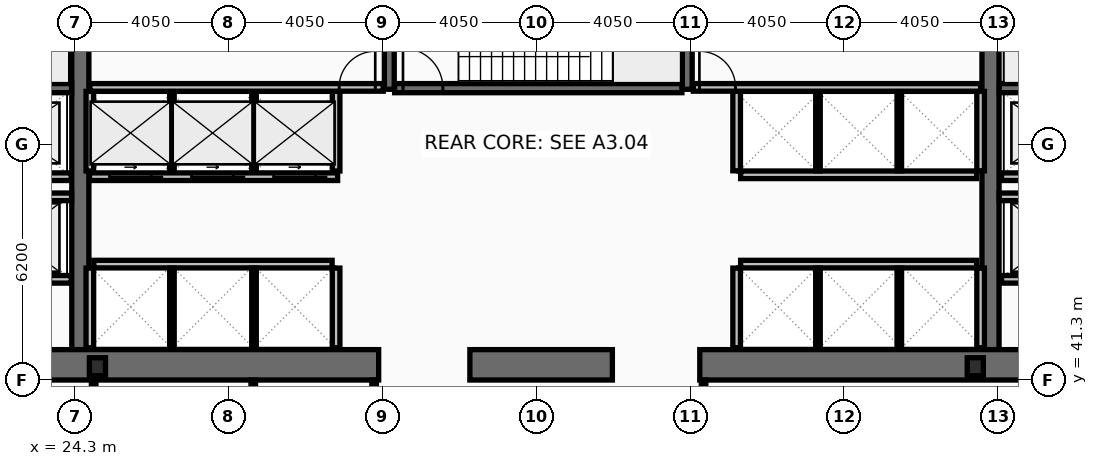
"""IFC4 building model, lengths in metres.
Left out: names, types, materials, properties, quantities, classifications, styles, units other than length and angle.
Written with IfcOpenShell. Run it as: python <this file> out.ifc"""

import sys

from ifc_helpers import new_model, si_unit, direction, frame, frame_2d, origin, origin_2d, place, context, subcontext, project, spatial, rectangle, i_section, extrude, element, fill, save


model = new_model("IFC4")
c1 = context("Model", 3, precision=1e-05, world=origin(), true_north=direction((0.0, 1.0)))
c2 = subcontext(c1, "Body", "Model", "MODEL_VIEW")
j1 = project(units=[si_unit("LENGTHUNIT", "METRE"), si_unit("PLANEANGLEUNIT", "RADIAN")], contexts=[c1])
p1 = place(None, origin())
s1 = spatial("IfcSite", under=j1, at=p1, CompositionType="ELEMENT")
p2 = place(p1, origin())
s2 = spatial("IfcBuilding", under=s1, at=p2, CompositionType="ELEMENT")
p3 = place(p2, frame((0.0, 0.0, 15.4)))
s3 = spatial("IfcBuildingStorey", under=s2, at=p3, CompositionType="ELEMENT", Elevation=15.4)
for number, where, z_axis, x_axis in (
    (1, (24.45, 42.1, 0.0), (0.0, 0.0, 1.0), (0.0, 1.0, 0.0)),
    (2, (48.4, 42.1, 0.0), (0.0, 0.0, 1.0), (0.0, 1.0, 0.0)),
):
    element("IfcWall", number, at=place(p3, frame(where, z_axis=z_axis, x_axis=x_axis)), inside=s3, PredefinedType="SHEAR", context=c2, shape_type="SweptSolid", body=[
        extrude(rectangle(XDim=10.8, YDim=0.45, at=frame_2d((5.4, 0.0))), origin(), (0.0, 0.0, 1.0), 4.78),
    ])
p4 = place(p3, frame((32.3, 41.7, 0.0), z_axis=(0.0, 0.0, 1.0), x_axis=(-1.0, 0.0, 0.0)))
e3 = element("IfcWall", 3, at=p4, inside=s3, PredefinedType="SHEAR", context=c2, shape_type="SweptSolid", body=[
    extrude(rectangle(XDim=11.45, YDim=0.8, at=frame_2d((5.725, 0.0))), origin(), (0.0, 0.0, 1.0), 4.78),
])
p5 = place(p3, frame((38.45, 41.7, 0.0), z_axis=(0.0, 0.0, 1.0), x_axis=(-1.0, 0.0, 0.0)))
e4 = element("IfcWall", 4, at=p5, inside=s3, PredefinedType="SHEAR", context=c2, shape_type="SweptSolid", body=[
    extrude(rectangle(XDim=3.75, YDim=0.8, at=frame_2d((1.875, 0.0))), origin(), (0.0, 0.0, 1.0), 4.78),
])
p6 = place(p3, frame((52.05, 41.7, 0.0), z_axis=(0.0, 0.0, 1.0), x_axis=(-1.0, 0.0, 0.0)))
e5 = element("IfcWall", 5, at=p6, inside=s3, PredefinedType="SHEAR", context=c2, shape_type="SweptSolid", body=[
    extrude(rectangle(XDim=11.3, YDim=0.8, at=frame_2d((5.65, 0.0))), origin(), (0.0, 0.0, 1.0), 4.78),
])
for number, where, z_axis, x_axis in (
    (6, (32.58, 48.95, 0.0), (0.0, 0.0, 1.0), (0.0, 1.0, 0.0)),
    (7, (40.42, 48.95, 0.0), (0.0, 0.0, 1.0), (0.0, 1.0, 0.0)),
):
    element("IfcWall", number, at=place(p3, frame(where, z_axis=z_axis, x_axis=x_axis)), inside=s3, PredefinedType="SHEAR", context=c2, shape_type="SweptSolid", body=[
        extrude(rectangle(XDim=3.95, YDim=0.26, at=frame_2d((1.975, 0.0))), origin(), (0.0, 0.0, 1.0), 4.78),
    ])
p7 = place(p3, frame((17.0, 48.98, 0.0), z_axis=(0.0, 0.0, 1.0), x_axis=(1.0, 0.0, 0.0)))
e8 = element("IfcWall", 8, at=p7, inside=s3, PredefinedType="SHEAR", context=c2, shape_type="SweptSolid", body=[
    extrude(rectangle(XDim=7.22, YDim=0.24, at=frame_2d((3.61, 0.0))), origin(), (0.0, 0.0, 1.0), 4.78),
])
p8 = place(p7, frame((0.22, 0.0, 0.0)))
e9 = element("IfcOpeningElement", 9, at=p8, cuts=e8, PredefinedType="OPENING", context=c2, shape_type="SweptSolid", body=[
    extrude(rectangle(XDim=1.05, YDim=2.15, at=frame_2d((0.525, 1.075))), frame((0.0, 0.13, 0.0), z_axis=(0.0, -1.0, 0.0), x_axis=(1.0, 0.0, 0.0)), (0.0, 0.0, 1.0), 0.26),
])
p9 = place(p3, frame((48.63, 48.98, 0.0), z_axis=(0.0, 0.0, 1.0), x_axis=(1.0, 0.0, 0.0)))
e10 = element("IfcWall", 10, at=p9, inside=s3, PredefinedType="SHEAR", context=c2, shape_type="SweptSolid", body=[
    extrude(rectangle(XDim=7.27, YDim=0.24, at=frame_2d((3.635, 0.0))), origin(), (0.0, 0.0, 1.0), 4.78),
])
p10 = place(p9, frame((6.0, 0.0, 0.0)))
e11 = element("IfcOpeningElement", 11, at=p10, cuts=e10, PredefinedType="OPENING", context=c2, shape_type="SweptSolid", body=[
    extrude(rectangle(XDim=1.05, YDim=2.15, at=frame_2d((0.525, 1.075))), frame((0.0, 0.13, 0.0), z_axis=(0.0, -1.0, 0.0), x_axis=(1.0, 0.0, 0.0)), (0.0, 0.0, 1.0), 0.26),
])
p11 = place(p3, frame((32.72, 48.98, 0.0), z_axis=(0.0, 0.0, 1.0), x_axis=(1.0, 0.0, 0.0)))
e12 = element("IfcWall", 12, at=p11, inside=s3, PredefinedType="SHEAR", context=c2, shape_type="SweptSolid", body=[
    extrude(rectangle(XDim=7.56, YDim=0.24, at=frame_2d((3.78, 0.0))), origin(), (0.0, 0.0, 1.0), 4.78),
])
p12 = place(p11, frame((0.22, 0.0, 0.0)))
e13 = element("IfcOpeningElement", 13, at=p12, cuts=e12, PredefinedType="OPENING", context=c2, shape_type="SweptSolid", body=[
    extrude(rectangle(XDim=1.05, YDim=2.15, at=frame_2d((0.525, 1.075))), frame((0.0, 0.13, 0.0), z_axis=(0.0, -1.0, 0.0), x_axis=(1.0, 0.0, 0.0)), (0.0, 0.0, 1.0), 0.26),
])
for number, where, z_axis, x_axis in (
    (14, (24.9, 41.65, 0.0), (0.0, 0.0, 1.0), (1.0, 0.0, 0.0)),
    (15, (48.0, 41.65, 0.0), (0.0, 0.0, 1.0), (1.0, 0.0, 0.0)),
):
    element("IfcColumn", number, at=place(p3, frame(where, z_axis=z_axis, x_axis=x_axis)), inside=s3, PredefinedType="COLUMN", context=c2, shape_type="SweptSolid", body=[
        extrude(i_section(OverallWidth=0.424, OverallDepth=0.474, WebThickness=0.048, FlangeThickness=0.077, at=origin_2d()), origin(), (0.0, 0.0, 1.0), 5.0),
    ])
p13 = place(p3, frame((51.61, 43.95, 0.0), z_axis=(0.0, 0.0, 1.0), x_axis=(-1.0, 0.0, 0.0)))
e16 = element("IfcWall", 16, at=p13, inside=s3, PredefinedType="PARTITIONING", context=c2, shape_type="SweptSolid", body=[
    extrude(rectangle(XDim=2.92, YDim=0.2, at=frame_2d((1.46, 0.0))), origin(), (0.0, 0.0, 1.0), 4.78),
])
p14 = place(p13, frame((0.81, 0.0, 0.0)))
e17 = element("IfcOpeningElement", 17, at=p14, cuts=e16, PredefinedType="OPENING", context=c2, shape_type="SweptSolid", body=[
    extrude(rectangle(XDim=1.3, YDim=2.18, at=frame_2d((0.65, 1.09))), frame((0.0, 0.11, 0.0), z_axis=(0.0, -1.0, 0.0), x_axis=(1.0, 0.0, 0.0)), (0.0, 0.0, 1.0), 0.22),
])
p15 = place(p3, frame((24.21, 43.95, 0.0), z_axis=(0.0, 0.0, 1.0), x_axis=(-1.0, 0.0, 0.0)))
e18 = element("IfcWall", 18, at=p15, inside=s3, PredefinedType="PARTITIONING", context=c2, shape_type="SweptSolid", body=[
    extrude(rectangle(XDim=2.97, YDim=0.2, at=frame_2d((1.485, 0.0))), origin(), (0.0, 0.0, 1.0), 4.78),
])
p16 = place(p15, frame((0.86, 0.0, 0.0)))
e19 = element("IfcOpeningElement", 19, at=p16, cuts=e18, PredefinedType="OPENING", context=c2, shape_type="SweptSolid", body=[
    extrude(rectangle(XDim=1.3, YDim=2.18, at=frame_2d((0.65, 1.09))), frame((0.0, 0.11, 0.0), z_axis=(0.0, -1.0, 0.0), x_axis=(1.0, 0.0, 0.0)), (0.0, 0.0, 1.0), 0.22),
])
p17 = place(p3, frame((51.61, 46.65, 0.0), z_axis=(0.0, 0.0, 1.0), x_axis=(-1.0, 0.0, 0.0)))
e20 = element("IfcWall", 20, at=p17, inside=s3, PredefinedType="PARTITIONING", context=c2, shape_type="SweptSolid", body=[
    extrude(rectangle(XDim=2.92, YDim=0.2, at=frame_2d((1.46, 0.0))), origin(), (0.0, 0.0, 1.0), 4.78),
])
p18 = place(p17, frame((0.86, 0.0, 0.0)))
e21 = element("IfcOpeningElement", 21, at=p18, cuts=e20, PredefinedType="OPENING", context=c2, shape_type="SweptSolid", body=[
    extrude(rectangle(XDim=1.2, YDim=2.18, at=frame_2d((0.6, 1.09))), frame((0.0, 0.11, 0.0), z_axis=(0.0, -1.0, 0.0), x_axis=(1.0, 0.0, 0.0)), (0.0, 0.0, 1.0), 0.22),
])
p19 = place(p3, frame((24.21, 46.65, 0.0), z_axis=(0.0, 0.0, 1.0), x_axis=(-1.0, 0.0, 0.0)))
e22 = element("IfcWall", 22, at=p19, inside=s3, PredefinedType="PARTITIONING", context=c2, shape_type="SweptSolid", body=[
    extrude(rectangle(XDim=2.97, YDim=0.2, at=frame_2d((1.485, 0.0))), origin(), (0.0, 0.0, 1.0), 4.78),
])
p20 = place(p19, frame((0.91, 0.0, 0.0)))
e23 = element("IfcOpeningElement", 23, at=p20, cuts=e22, PredefinedType="OPENING", context=c2, shape_type="SweptSolid", body=[
    extrude(rectangle(XDim=1.2, YDim=2.18, at=frame_2d((0.6, 1.09))), frame((0.0, 0.11, 0.0), z_axis=(0.0, -1.0, 0.0), x_axis=(1.0, 0.0, 0.0)), (0.0, 0.0, 1.0), 0.22),
])
p21 = place(p3, frame((31.22, 46.65, 0.0), z_axis=(0.0, 0.0, 1.0), x_axis=(-1.0, 0.0, 0.0)))
e24 = element("IfcWall", 24, at=p21, inside=s3, PredefinedType="PARTITIONING", context=c2, shape_type="SweptSolid", body=[
    extrude(rectangle(XDim=6.53, YDim=0.2, at=frame_2d((3.265, 0.0))), origin(), (0.0, 0.0, 1.0), 4.78),
])
p22 = place(p21, frame((4.9, 0.0, 0.0)))
e25 = element("IfcOpeningElement", 25, at=p22, cuts=e24, PredefinedType="OPENING", context=c2, shape_type="SweptSolid", body=[
    extrude(rectangle(XDim=1.1, YDim=2.18, at=frame_2d((0.55, 1.09))), frame((0.0, 0.11, 0.0), z_axis=(0.0, -1.0, 0.0), x_axis=(1.0, 0.0, 0.0)), (0.0, 0.0, 1.0), 0.22),
])
p23 = place(p21, frame((2.74, 0.0, 0.0)))
e26 = element("IfcOpeningElement", 26, at=p23, cuts=e24, PredefinedType="OPENING", context=c2, shape_type="SweptSolid", body=[
    extrude(rectangle(XDim=1.1, YDim=2.18, at=frame_2d((0.55, 1.09))), frame((0.0, 0.11, 0.0), z_axis=(0.0, -1.0, 0.0), x_axis=(1.0, 0.0, 0.0)), (0.0, 0.0, 1.0), 0.22),
])
p24 = place(p21, frame((0.58, 0.0, 0.0)))
e27 = element("IfcOpeningElement", 27, at=p24, cuts=e24, PredefinedType="OPENING", context=c2, shape_type="SweptSolid", body=[
    extrude(rectangle(XDim=1.1, YDim=2.18, at=frame_2d((0.55, 1.09))), frame((0.0, 0.11, 0.0), z_axis=(0.0, -1.0, 0.0), x_axis=(1.0, 0.0, 0.0)), (0.0, 0.0, 1.0), 0.22),
])
p25 = place(p3, frame((21.2, 46.12, 0.0), z_axis=(0.0, 0.0, 1.0), x_axis=(1.0, 0.0, 0.0)))
e28 = element("IfcWall", 28, at=p25, inside=s3, PredefinedType="PARTITIONING", context=c2, shape_type="SweptSolid", body=[
    extrude(rectangle(XDim=3.02, YDim=0.2, at=frame_2d((1.51, 0.0))), origin(), (0.0, 0.0, 1.0), 4.78),
])
p26 = place(p3, frame((48.63, 46.12, 0.0), z_axis=(0.0, 0.0, 1.0), x_axis=(1.0, 0.0, 0.0)))
e29 = element("IfcWall", 29, at=p26, inside=s3, PredefinedType="PARTITIONING", context=c2, shape_type="SweptSolid", body=[
    extrude(rectangle(XDim=3.07, YDim=0.2, at=frame_2d((1.535, 0.0))), origin(), (0.0, 0.0, 1.0), 4.78),
])
for number, where, z_axis, x_axis in (
    (30, (24.7, 46.8, 0.0), (0.0, 0.0, 1.0), (0.0, 1.0, 0.0)),
    (31, (31.18, 46.8, 0.0), (0.0, 0.0, 1.0), (0.0, 1.0, 0.0)),
):
    element("IfcWall", number, at=place(p3, frame(where, z_axis=z_axis, x_axis=x_axis)), inside=s3, PredefinedType="PARTITIONING", context=c2, shape_type="SweptSolid", body=[
        extrude(rectangle(XDim=2.095, YDim=0.2, at=frame_2d((1.047, 0.0))), origin(), (0.0, 0.0, 1.0), 4.78),
    ])
for number, where, z_axis, x_axis in (
    (32, (26.86, 46.8, 0.0), (0.0, 0.0, 1.0), (0.0, 1.0, 0.0)),
    (33, (29.02, 46.8, 0.0), (0.0, 0.0, 1.0), (0.0, 1.0, 0.0)),
):
    element("IfcWall", number, at=place(p3, frame(where, z_axis=z_axis, x_axis=x_axis)), inside=s3, PredefinedType="PARTITIONING", context=c2, shape_type="SweptSolid", body=[
        extrude(rectangle(XDim=2.095, YDim=0.12, at=frame_2d((1.047, 0.0))), origin(), (0.0, 0.0, 1.0), 4.78),
    ])
p27 = place(p3, frame((24.805, 44.35, 0.0), z_axis=(0.0, 0.0, 1.0), x_axis=(1.0, 0.0, 0.0)))
e34 = element("IfcWall", 34, at=p27, inside=s3, PredefinedType="PARTITIONING", context=c2, shape_type="SweptSolid", body=[
    extrude(rectangle(XDim=6.27, YDim=0.2, at=frame_2d((3.135, 0.0))), origin(), (0.0, 0.0, 1.0), 4.78),
])
for number, where, z_axis, x_axis in (
    (35, (24.7, 42.15, 0.0), (0.0, 0.0, 1.0), (0.0, 1.0, 0.0)),
    (36, (31.18, 42.15, 0.0), (0.0, 0.0, 1.0), (0.0, 1.0, 0.0)),
):
    element("IfcWall", number, at=place(p3, frame(where, z_axis=z_axis, x_axis=x_axis)), inside=s3, PredefinedType="PARTITIONING", context=c2, shape_type="SweptSolid", body=[
        extrude(rectangle(XDim=2.095, YDim=0.2, at=frame_2d((1.048, 0.0))), origin(), (0.0, 0.0, 1.0), 4.78),
    ])
for number, where, z_axis, x_axis in (
    (37, (26.86, 42.15, 0.0), (0.0, 0.0, 1.0), (0.0, 1.0, 0.0)),
    (38, (29.02, 42.15, 0.0), (0.0, 0.0, 1.0), (0.0, 1.0, 0.0)),
):
    element("IfcWall", number, at=place(p3, frame(where, z_axis=z_axis, x_axis=x_axis)), inside=s3, PredefinedType="PARTITIONING", context=c2, shape_type="SweptSolid", body=[
        extrude(rectangle(XDim=2.095, YDim=0.12, at=frame_2d((1.048, 0.0))), origin(), (0.0, 0.0, 1.0), 4.78),
    ])
p28 = place(p3, frame((41.825, 46.7, 0.0), z_axis=(0.0, 0.0, 1.0), x_axis=(1.0, 0.0, 0.0)))
e39 = element("IfcWall", 39, at=p28, inside=s3, PredefinedType="PARTITIONING", context=c2, shape_type="SweptSolid", body=[
    extrude(rectangle(XDim=6.21, YDim=0.2, at=frame_2d((3.105, 0.0))), origin(), (0.0, 0.0, 1.0), 4.78),
])
for number, where, z_axis, x_axis in (
    (40, (41.72, 46.805, 0.0), (0.0, 0.0, 1.0), (0.0, 1.0, 0.0)),
    (41, (48.14, 46.805, 0.0), (0.0, 0.0, 1.0), (0.0, 1.0, 0.0)),
):
    element("IfcWall", number, at=place(p3, frame(where, z_axis=z_axis, x_axis=x_axis)), inside=s3, PredefinedType="PARTITIONING", context=c2, shape_type="SweptSolid", body=[
        extrude(rectangle(XDim=2.09, YDim=0.2, at=frame_2d((1.045, 0.0))), origin(), (0.0, 0.0, 1.0), 4.78),
    ])
for number, where, z_axis, x_axis in (
    (42, (43.86, 46.805, 0.0), (0.0, 0.0, 1.0), (0.0, 1.0, 0.0)),
    (43, (46.0, 46.805, 0.0), (0.0, 0.0, 1.0), (0.0, 1.0, 0.0)),
):
    element("IfcWall", number, at=place(p3, frame(where, z_axis=z_axis, x_axis=x_axis)), inside=s3, PredefinedType="PARTITIONING", context=c2, shape_type="SweptSolid", body=[
        extrude(rectangle(XDim=2.09, YDim=0.12, at=frame_2d((1.045, 0.0))), origin(), (0.0, 0.0, 1.0), 4.78),
    ])
p29 = place(p3, frame((41.825, 44.35, 0.0), z_axis=(0.0, 0.0, 1.0), x_axis=(1.0, 0.0, 0.0)))
e44 = element("IfcWall", 44, at=p29, inside=s3, PredefinedType="PARTITIONING", context=c2, shape_type="SweptSolid", body=[
    extrude(rectangle(XDim=6.21, YDim=0.2, at=frame_2d((3.105, 0.0))), origin(), (0.0, 0.0, 1.0), 4.78),
])
for number, where, z_axis, x_axis in (
    (45, (41.72, 42.15, 0.0), (0.0, 0.0, 1.0), (0.0, 1.0, 0.0)),
    (46, (48.14, 42.15, 0.0), (0.0, 0.0, 1.0), (0.0, 1.0, 0.0)),
):
    element("IfcWall", number, at=place(p3, frame(where, z_axis=z_axis, x_axis=x_axis)), inside=s3, PredefinedType="PARTITIONING", context=c2, shape_type="SweptSolid", body=[
        extrude(rectangle(XDim=2.095, YDim=0.2, at=frame_2d((1.048, 0.0))), origin(), (0.0, 0.0, 1.0), 4.78),
    ])
for number, where, z_axis, x_axis in (
    (47, (43.86, 42.15, 0.0), (0.0, 0.0, 1.0), (0.0, 1.0, 0.0)),
    (48, (46.0, 42.15, 0.0), (0.0, 0.0, 1.0), (0.0, 1.0, 0.0)),
):
    element("IfcWall", number, at=place(p3, frame(where, z_axis=z_axis, x_axis=x_axis)), inside=s3, PredefinedType="PARTITIONING", context=c2, shape_type="SweptSolid", body=[
        extrude(rectangle(XDim=2.095, YDim=0.12, at=frame_2d((1.048, 0.0))), origin(), (0.0, 0.0, 1.0), 4.78),
    ])
p30 = place(p3, frame((24.7, 49.0, 0.0), z_axis=(0.0, 0.0, 1.0), x_axis=(1.0, 0.0, 0.0)))
e49 = element("IfcWall", 49, at=p30, inside=s3, PredefinedType="PARTITIONING", context=c2, shape_type="SweptSolid", body=[
    extrude(rectangle(XDim=7.72, YDim=0.2, at=frame_2d((3.86, 0.0))), origin(), (0.0, 0.0, 1.0), 4.78),
])
p31 = place(p30, frame((6.56, 0.0, 0.0)))
e50 = element("IfcOpeningElement", 50, at=p31, cuts=e49, PredefinedType="OPENING", context=c2, shape_type="SweptSolid", body=[
    extrude(rectangle(XDim=0.95, YDim=2.1, at=frame_2d((0.475, 1.05))), frame((0.0, 0.11, 0.0), z_axis=(0.0, -1.0, 0.0), x_axis=(1.0, 0.0, 0.0)), (0.0, 0.0, 1.0), 0.22),
])
p32 = place(p3, frame((40.58, 49.0, 0.0), z_axis=(0.0, 0.0, 1.0), x_axis=(1.0, 0.0, 0.0)))
e51 = element("IfcWall", 51, at=p32, inside=s3, PredefinedType="PARTITIONING", context=c2, shape_type="SweptSolid", body=[
    extrude(rectangle(XDim=7.56, YDim=0.2, at=frame_2d((3.78, 0.0))), origin(), (0.0, 0.0, 1.0), 4.78),
])
p33 = place(p32, frame((0.16, 0.0, 0.0)))
e52 = element("IfcOpeningElement", 52, at=p33, cuts=e51, PredefinedType="OPENING", context=c2, shape_type="SweptSolid", body=[
    extrude(rectangle(XDim=0.95, YDim=2.1, at=frame_2d((0.475, 1.05))), frame((0.0, 0.11, 0.0), z_axis=(0.0, -1.0, 0.0), x_axis=(1.0, 0.0, 0.0)), (0.0, 0.0, 1.0), 0.22),
])
p34 = place(p3, frame((24.8, 38.28, 0.0), z_axis=(0.0, 0.0, 1.0), x_axis=(0.0, 1.0, 0.0)))
e53 = element("IfcWall", 53, at=p34, inside=s3, PredefinedType="PARTITIONING", context=c2, shape_type="SweptSolid", body=[
    extrude(rectangle(XDim=3.02, YDim=0.12, at=frame_2d((1.51, 0.0))), origin(), (0.0, 0.0, 1.0), 3.87),
])
for number, where, z_axis, x_axis in (
    (54, (29.0, 38.28, 0.0), (0.0, 0.0, 1.0), (0.0, 1.0, 0.0)),
    (55, (32.18, 38.28, 0.0), (0.0, 0.0, 1.0), (0.0, 1.0, 0.0)),
    (56, (40.85, 38.28, 0.0), (0.0, 0.0, 1.0), (0.0, 1.0, 0.0)),
):
    element("IfcWall", number, at=place(p3, frame(where, z_axis=z_axis, x_axis=x_axis)), inside=s3, PredefinedType="PARTITIONING", context=c2, shape_type="SweptSolid", body=[
        extrude(rectangle(XDim=3.02, YDim=0.12, at=frame_2d((1.51, 0.0))), origin(), (0.0, 0.0, 1.0), 4.78),
    ])
p35 = place(p12, origin())
e57 = element("IfcDoor", 57, at=p35, inside=s3, OperationType="SINGLE_SWING_LEFT", PredefinedType="DOOR", context=c2, shape_type="SweptSolid", body=[
    extrude(rectangle(XDim=1.05, YDim=2.15, at=frame_2d((0.525, 1.075))), frame((0.0, 0.025, 0.0), z_axis=(0.0, -1.0, 0.0), x_axis=(1.0, 0.0, 0.0)), (0.0, 0.0, 1.0), 0.05),
])
fill(e13, e57)
p36 = place(p22, origin())
e58 = element("IfcDoor", 58, at=p36, inside=s3, OperationType="SLIDING_TO_LEFT", PredefinedType="DOOR", context=c2, shape_type="SweptSolid", body=[
    extrude(rectangle(XDim=1.1, YDim=2.18, at=frame_2d((0.55, 1.09))), frame((0.0, 0.025, 0.0), z_axis=(0.0, -1.0, 0.0), x_axis=(1.0, 0.0, 0.0)), (0.0, 0.0, 1.0), 0.05),
])
fill(e25, e58)
p37 = place(p23, origin())
e59 = element("IfcDoor", 59, at=p37, inside=s3, OperationType="SLIDING_TO_LEFT", PredefinedType="DOOR", context=c2, shape_type="SweptSolid", body=[
    extrude(rectangle(XDim=1.1, YDim=2.18, at=frame_2d((0.55, 1.09))), frame((0.0, 0.025, 0.0), z_axis=(0.0, -1.0, 0.0), x_axis=(1.0, 0.0, 0.0)), (0.0, 0.0, 1.0), 0.05),
])
fill(e26, e59)
p38 = place(p24, origin())
e60 = element("IfcDoor", 60, at=p38, inside=s3, OperationType="SLIDING_TO_LEFT", PredefinedType="DOOR", context=c2, shape_type="SweptSolid", body=[
    extrude(rectangle(XDim=1.1, YDim=2.18, at=frame_2d((0.55, 1.09))), frame((0.0, 0.025, 0.0), z_axis=(0.0, -1.0, 0.0), x_axis=(1.0, 0.0, 0.0)), (0.0, 0.0, 1.0), 0.05),
])
fill(e27, e60)
p39 = place(p31, origin())
e61 = element("IfcDoor", 61, at=p39, inside=s3, OperationType="SINGLE_SWING_RIGHT", PredefinedType="DOOR", context=c2, shape_type="SweptSolid", body=[
    extrude(rectangle(XDim=0.95, YDim=2.1, at=frame_2d((0.475, 1.05))), frame((0.0, 0.025, 0.0), z_axis=(0.0, -1.0, 0.0), x_axis=(1.0, 0.0, 0.0)), (0.0, 0.0, 1.0), 0.05),
])
fill(e50, e61)
p40 = place(p33, origin())
e62 = element("IfcDoor", 62, at=p40, inside=s3, OperationType="SINGLE_SWING_LEFT", PredefinedType="DOOR", context=c2, shape_type="SweptSolid", body=[
    extrude(rectangle(XDim=0.95, YDim=2.1, at=frame_2d((0.475, 1.05))), frame((0.0, 0.025, 0.0), z_axis=(0.0, -1.0, 0.0), x_axis=(1.0, 0.0, 0.0)), (0.0, 0.0, 1.0), 0.05),
])
fill(e52, e62)
save(model, sys.argv[1])
